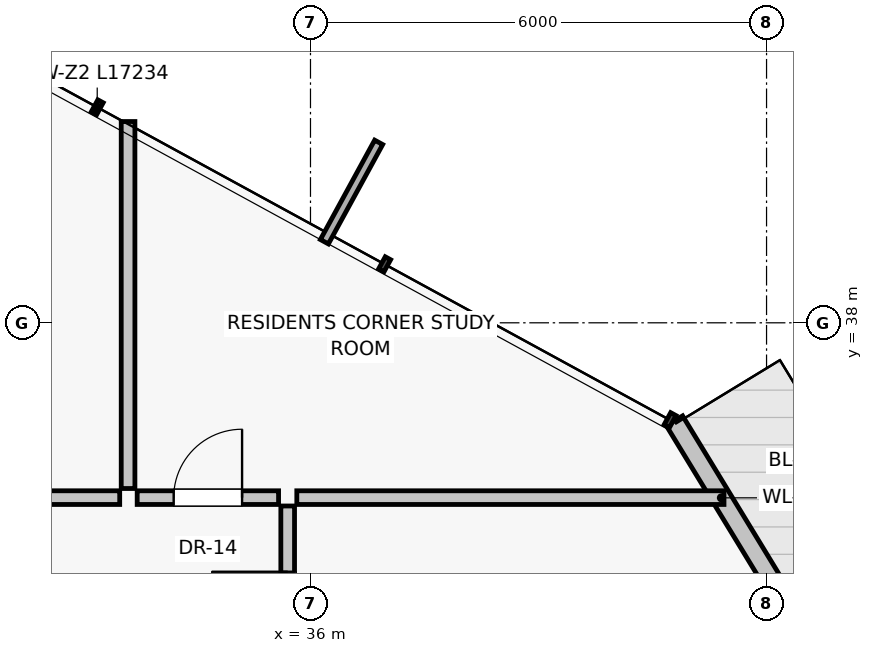
"""IFC4 building model, lengths in metres.
Left out: names, types, materials, properties, quantities, classifications, styles, units other than length and angle.
Written with IfcOpenShell. Run it as: python <this file> out.ifc"""

import sys

from ifc_helpers import new_model, si_unit, direction, frame, frame_2d, origin, place, context, subcontext, project, spatial, rectangle, extrude, source, transform, mapped, element, fill, save


model = new_model("IFC4")
c1 = context("Model", 3, precision=1e-05, world=origin(), true_north=direction((0.0, 1.0)))
c2 = subcontext(c1, "Body", "Model", "MODEL_VIEW")
j1 = project(units=[si_unit("LENGTHUNIT", "METRE"), si_unit("PLANEANGLEUNIT", "RADIAN")], contexts=[c1])
p1 = place(None, origin())
s1 = spatial("IfcSite", under=j1, at=p1, CompositionType="ELEMENT")
p2 = place(p1, origin())
s2 = spatial("IfcBuilding", under=s1, at=p2, CompositionType="ELEMENT")
p3 = place(p2, frame((0.0, 0.0, 132.75)))
s3 = spatial("IfcBuildingStorey", under=s2, at=p3, CompositionType="ELEMENT", Elevation=132.75)
p4 = place(p3, frame((42.992, 33.096, 0.0), z_axis=(0.0, 0.0, 1.0), x_axis=(-0.520369515568, 0.85394119661, 0.0)))
e1 = element("IfcWall", 1, at=p4, inside=s3, PredefinedType="SOLIDWALL", context=c2, shape_type="SweptSolid", body=[
    extrude(rectangle(XDim=4.233, YDim=0.25, at=frame_2d((2.117, 0.0))), origin(), (0.0, 0.0, 1.0), 3.0),
])
p5 = place(p4, frame((0.46, 0.0, 0.0)))
e2 = element("IfcOpeningElement", 2, at=p5, cuts=e1, PredefinedType="OPENING", context=c2, shape_type="SweptSolid", body=[
    extrude(rectangle(XDim=1.15, YDim=2.25, at=frame_2d((0.575, 1.125))), frame((0.0, 0.135, 0.0), z_axis=(0.0, -1.0, 0.0), x_axis=(1.0, 0.0, 0.0)), (0.0, 0.0, 1.0), 0.27),
])
p6 = place(p3, frame((33.6, 35.82, 0.0), z_axis=(0.0, 0.0, 1.0), x_axis=(0.0, 1.0, 0.0)))
e3 = element("IfcWall", 3, at=p6, inside=s3, PredefinedType="PARTITIONING", context=c2, shape_type="SweptSolid", body=[
    extrude(rectangle(XDim=4.828, YDim=0.18, at=frame_2d((2.414, 0.0))), origin(), (0.0, 0.0, 1.0), 3.0),
])
p7 = place(p3, frame((28.343, 35.7, 0.0), z_axis=(0.0, 0.0, 1.0), x_axis=(1.0, 0.0, 0.0)))
e4 = element("IfcWall", 4, at=p7, inside=s3, PredefinedType="PARTITIONING", context=c2, shape_type="SweptSolid", body=[
    extrude(rectangle(XDim=5.147, YDim=0.18, at=frame_2d((2.573, 0.0))), origin(), (0.0, 0.0, 1.0), 2.58),
])
p8 = place(p7, frame((2.073, 0.0, 0.0)))
e5 = element("IfcOpeningElement", 5, at=p8, cuts=e4, PredefinedType="OPENING", context=c2, shape_type="SweptSolid", body=[
    extrude(rectangle(XDim=1.0, YDim=2.01, at=frame_2d((0.5, 1.005))), frame((0.0, 0.1, 0.0), z_axis=(0.0, -1.0, 0.0), x_axis=(1.0, 0.0, 0.0)), (0.0, 0.0, 1.0), 0.2),
])
p9 = place(p3, frame((35.82, 35.7, 0.0), z_axis=(0.0, 0.0, 1.0), x_axis=(1.0, 0.0, 0.0)))
e6 = element("IfcWall", 6, at=p9, inside=s3, PredefinedType="PARTITIONING", context=c2, shape_type="SweptSolid", body=[
    extrude(rectangle(XDim=5.62, YDim=0.18, at=frame_2d((2.81, 0.0))), origin(), (0.0, 0.0, 1.0), 3.0),
])
p10 = place(p3, frame((35.7, 32.86, 0.0), z_axis=(0.0, 0.0, 1.0), x_axis=(0.0, 1.0, 0.0)))
e7 = element("IfcWall", 7, at=p10, inside=s3, PredefinedType="PARTITIONING", context=c2, shape_type="SweptSolid", body=[
    extrude(rectangle(XDim=2.73, YDim=0.18, at=frame_2d((1.365, 0.0))), origin(), (0.0, 0.0, 1.0), 3.0),
])
p11 = place(p10, frame((0.865, 0.0, 0.0)))
e8 = element("IfcOpeningElement", 8, at=p11, cuts=e7, PredefinedType="OPENING", context=c2, shape_type="SweptSolid", body=[
    extrude(rectangle(XDim=1.0, YDim=2.01, at=frame_2d((0.5, 1.005))), frame((0.0, 0.1, 0.0), z_axis=(0.0, -1.0, 0.0), x_axis=(1.0, 0.0, 0.0)), (0.0, 0.0, 1.0), 0.2),
])
p12 = place(p3, frame((33.72, 35.7, 0.0), z_axis=(0.0, 0.0, 1.0), x_axis=(1.0, 0.0, 0.0)))
e9 = element("IfcWall", 9, at=p12, inside=s3, PredefinedType="PARTITIONING", context=c2, shape_type="SweptSolid", body=[
    extrude(rectangle(XDim=1.86, YDim=0.18, at=frame_2d((0.93, 0.0))), origin(), (0.0, 0.0, 1.0), 3.0),
])
p13 = place(p12, frame((0.48, 0.0, 0.0)))
e10 = element("IfcOpeningElement", 10, at=p13, cuts=e9, PredefinedType="OPENING", context=c2, shape_type="SweptSolid", body=[
    extrude(rectangle(XDim=0.9, YDim=2.01, at=frame_2d((0.45, 1.005))), frame((0.0, 0.1, 0.0), z_axis=(0.0, -1.0, 0.0), x_axis=(1.0, 0.0, 0.0)), (0.0, 0.0, 1.0), 0.2),
])
m1 = source(origin(), c2, "Body", "SweptSolid", [
    extrude(rectangle(XDim=1.0, YDim=2.01, at=frame_2d((0.5, 1.005))), frame((0.0, 0.025, 0.0), z_axis=(0.0, -1.0, 0.0), x_axis=(1.0, 0.0, 0.0)), (0.0, 0.0, 1.0), 0.05),
])
p14 = place(p11, origin())
e11 = element("IfcDoor", 11, at=p14, inside=s3, OperationType="SINGLE_SWING_RIGHT", PredefinedType="DOOR", context=c2, shape_type="MappedRepresentation", body=[
    mapped(m1, transform((0.0, 0.0, 0.0), scale=1.0)),
])
fill(e8, e11)
m2 = source(origin(), c2, "Body", "SweptSolid", [
    extrude(rectangle(XDim=0.9, YDim=2.01, at=frame_2d((0.45, 1.005))), frame((0.0, 0.025, 0.0), z_axis=(0.0, -1.0, 0.0), x_axis=(1.0, 0.0, 0.0)), (0.0, 0.0, 1.0), 0.05),
])
p15 = place(p13, origin())
e12 = element("IfcDoor", 12, at=p15, inside=s3, OperationType="SINGLE_SWING_RIGHT", PredefinedType="DOOR", context=c2, shape_type="MappedRepresentation", body=[
    mapped(m2, transform((0.0, 0.0, 0.0), scale=1.0)),
])
fill(e10, e12)
save(model, sys.argv[1])
